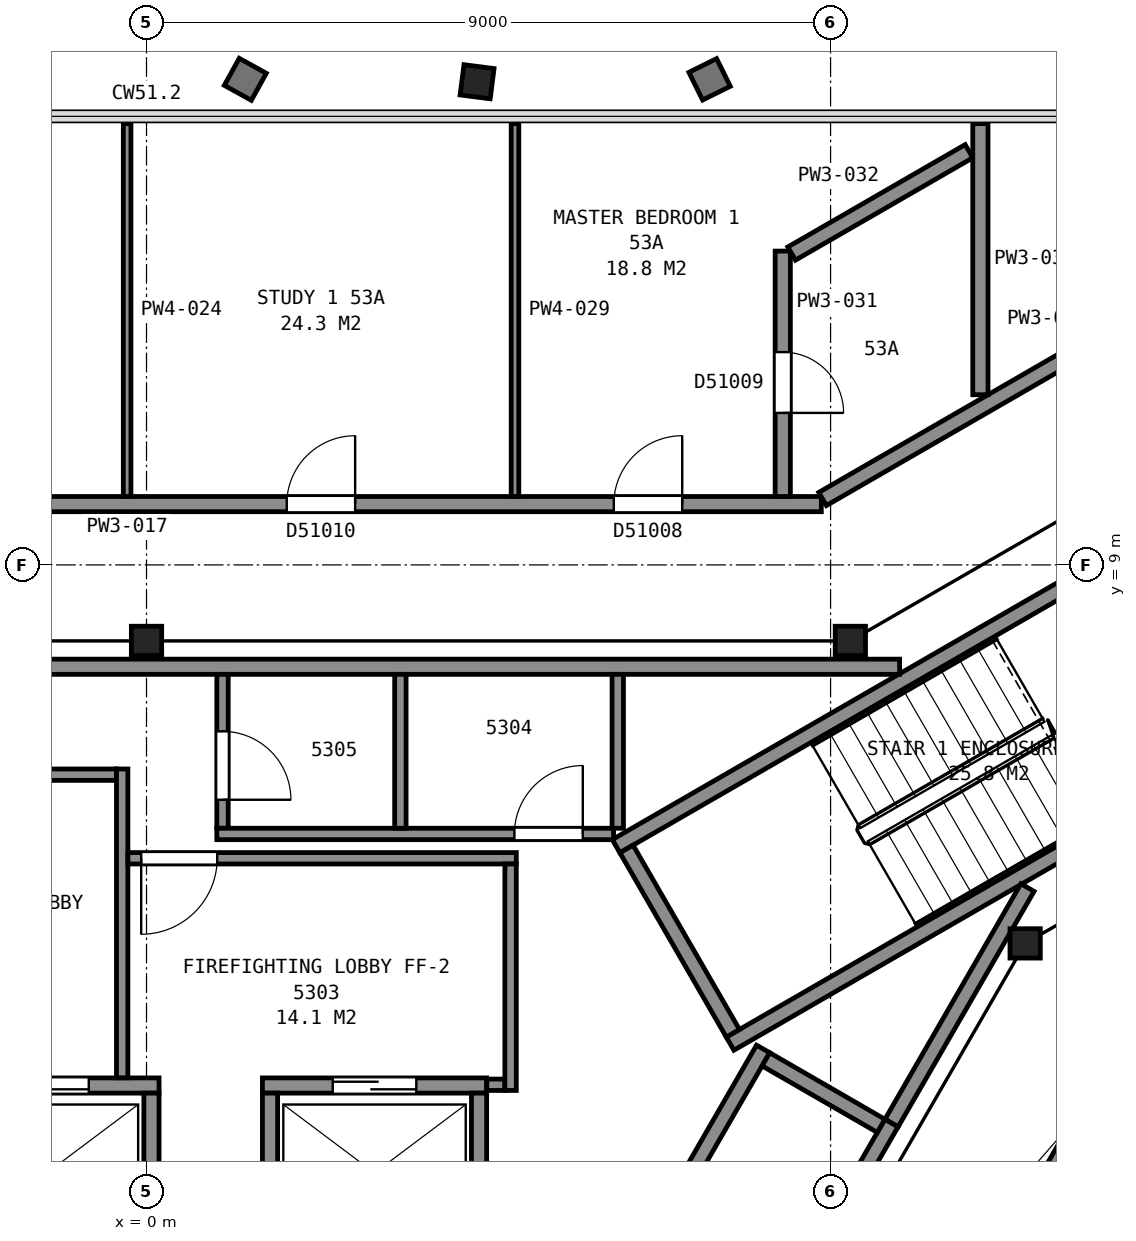
"""IFC4 building model, lengths in metres.
Left out: names, types, materials, properties, quantities, classifications, styles, units other than length and angle.
Written with IfcOpenShell. Run it as: python <this file> out.ifc"""

import sys

from ifc_helpers import new_model, si_unit, direction, frame, frame_2d, origin, origin_2d, place, context, subcontext, project, spatial, rectangle, i_section, extrude, element, fill, save


model = new_model("IFC4")
c1 = context("Model", 3, precision=1e-05, world=origin(), true_north=direction((0.0, 1.0)))
c2 = subcontext(c1, "Body", "Model", "MODEL_VIEW")
j1 = project(units=[si_unit("LENGTHUNIT", "METRE"), si_unit("PLANEANGLEUNIT", "RADIAN")], contexts=[c1])
p1 = place(None, origin())
s1 = spatial("IfcSite", under=j1, at=p1, CompositionType="ELEMENT")
p2 = place(p1, origin())
s2 = spatial("IfcBuilding", under=s1, at=p2, CompositionType="ELEMENT")
p3 = place(p2, frame((0.0, 0.0, 213.8)))
s3 = spatial("IfcBuildingStorey", under=s2, at=p3, CompositionType="ELEMENT", Elevation=213.8)
p4 = place(p3, frame((4.321, 15.137, 0.035), z_axis=(0.023914784976, 0.185835055632, 0.982289883465), x_axis=(0.999704292693, -0.000115278447, -0.024316946377)))
e1 = element("IfcColumn", 1, at=p4, inside=s3, PredefinedType="COLUMN", context=c2, shape_type="SweptSolid", body=[
    extrude(i_section(OverallWidth=0.401, OverallDepth=0.399, WebThickness=0.025, FlangeThickness=0.04, FilletRadius=0.015, at=origin_2d()), origin(), (0.0, 0.0, 1.0), 3.696),
])
for number, where, z_axis, x_axis in (
    (2, (11.56, 4.02, 0.0), (0.0, 0.0, 1.0), (1.0, 0.0, 0.0)),
    (3, (9.26, 8.0, 0.0), (0.0, 0.0, 1.0), (1.0, 0.0, 0.0)),
    (4, (0.0, 8.0, 0.0), (0.0, 0.0, 1.0), (1.0, 0.0, 0.0)),
):
    element("IfcColumn", number, at=place(p3, frame(where, z_axis=z_axis, x_axis=x_axis)), inside=s3, PredefinedType="COLUMN", context=c2, shape_type="SweptSolid", body=[
        extrude(i_section(OverallWidth=0.399, OverallDepth=0.386, WebThickness=0.021, FlangeThickness=0.033, FilletRadius=0.015, at=origin_2d()), origin(), (0.0, 0.0, 1.0), 3.7),
    ])
for number, where, z_axis, x_axis in (
    (5, (6.178, 5.299, 0.0), (0.0, 0.0, 1.0), (0.866, 0.5, 0.0)),
    (6, (7.678, 2.701, 0.0), (0.0, 0.0, 1.0), (0.866, 0.5, 0.0)),
):
    element("IfcWall", number, at=place(p3, frame(where, z_axis=z_axis, x_axis=x_axis)), inside=s3, PredefinedType="PARTITIONING", context=c2, shape_type="SweptSolid", body=[
        extrude(rectangle(XDim=9.6, YDim=0.2, at=frame_2d((4.8, 0.0))), origin(), (0.0, 0.0, 1.0), 3.45),
    ])
p5 = place(p3, frame((7.715, 2.838, 0.0), z_axis=(0.0, 0.0, 1.0), x_axis=(-0.500049511043, 0.865996816683, 0.0)))
e7 = element("IfcWall", 7, at=p5, inside=s3, PredefinedType="PARTITIONING", context=c2, shape_type="SweptSolid", body=[
    extrude(rectangle(XDim=2.8, YDim=0.2, at=frame_2d((1.4, 0.0))), origin(), (0.0, 0.0, 1.0), 3.45),
])
p6 = place(p3, frame((-2.785, 2.15, 0.0), z_axis=(0.0, 0.0, 1.0), x_axis=(1.0, 0.0, 0.0)))
e8 = element("IfcWall", 8, at=p6, inside=s3, PredefinedType="PARTITIONING", context=c2, shape_type="SweptSolid", body=[
    extrude(rectangle(XDim=2.95, YDim=0.2, at=frame_2d((1.475, 0.0))), origin(), (0.0, 0.0, 1.0), 3.7),
])
p7 = place(p6, frame((0.925, 0.0, 0.0)))
e9 = element("IfcOpeningElement", 9, at=p7, cuts=e8, PredefinedType="OPENING", context=c2, shape_type="SweptSolid", body=[
    extrude(rectangle(XDim=1.1, YDim=2.1, at=frame_2d((0.55, 1.05))), frame((0.0, 0.11, 0.0), z_axis=(0.0, -1.0, 0.0), x_axis=(1.0, 0.0, 0.0)), (0.0, 0.0, 1.0), 0.22),
])
p8 = place(p3, frame((1.525, 2.15, 0.0), z_axis=(0.0, 0.0, 1.0), x_axis=(1.0, 0.0, 0.0)))
e10 = element("IfcWall", 10, at=p8, inside=s3, PredefinedType="PARTITIONING", context=c2, shape_type="SweptSolid", body=[
    extrude(rectangle(XDim=2.95, YDim=0.2, at=frame_2d((1.475, 0.0))), origin(), (0.0, 0.0, 1.0), 3.7),
])
p9 = place(p8, frame((0.925, 0.0, 0.0)))
e11 = element("IfcOpeningElement", 11, at=p9, cuts=e10, PredefinedType="OPENING", context=c2, shape_type="SweptSolid", body=[
    extrude(rectangle(XDim=1.1, YDim=2.1, at=frame_2d((0.55, 1.05))), frame((0.0, 0.11, 0.0), z_axis=(0.0, -1.0, 0.0), x_axis=(1.0, 0.0, 0.0)), (0.0, 0.0, 1.0), 0.22),
])
p10 = place(p3, frame((7.351, -2.587, 0.0), z_axis=(0.0, 0.0, 1.0), x_axis=(0.500002801628, 0.866023786258, 0.0)))
e12 = element("IfcWall", 12, at=p10, inside=s3, PredefinedType="PARTITIONING", context=c2, shape_type="SweptSolid", body=[
    extrude(rectangle(XDim=4.9, YDim=0.2, at=frame_2d((2.45, 0.0))), origin(), (0.0, 0.0, 1.0), 3.7),
])
p11 = place(p3, frame((5.663, -1.612, 0.0), z_axis=(0.0, 0.0, 1.0), x_axis=(0.49998122708, 0.866036242063, 0.0)))
e13 = element("IfcWall", 13, at=p11, inside=s3, PredefinedType="PARTITIONING", context=c2, shape_type="SweptSolid", body=[
    extrude(rectangle(XDim=4.9, YDim=0.2, at=frame_2d((2.45, 0.0))), origin(), (0.0, 0.0, 1.0), 3.7),
])
for number, where, z_axis, x_axis in (
    (14, (4.375, 0.1, 0.0), (0.0, 0.0, 1.0), (0.0, 1.0, 0.0)),
    (15, (1.625, 0.1, 0.0), (0.0, 0.0, 1.0), (0.0, 1.0, 0.0)),
    (16, (0.065, 0.1, 0.0), (0.0, 0.0, 1.0), (0.0, 1.0, 0.0)),
):
    element("IfcWall", number, at=place(p3, frame(where, z_axis=z_axis, x_axis=x_axis)), inside=s3, PredefinedType="PARTITIONING", context=c2, shape_type="SweptSolid", body=[
        extrude(rectangle(XDim=1.95, YDim=0.2, at=frame_2d((0.975, 0.0))), origin(), (0.0, 0.0, 1.0), 3.7),
    ])
p12 = place(p3, frame((9.665, 1.62, 0.0), z_axis=(0.0, 0.0, 1.0), x_axis=(-0.866002029911, 0.500040482552, 0.0)))
e17 = element("IfcWall", 17, at=p12, inside=s3, PredefinedType="PARTITIONING", context=c2, shape_type="SweptSolid", body=[
    extrude(rectangle(XDim=1.75, YDim=0.2, at=frame_2d((0.875, 0.0))), origin(), (0.0, 0.0, 1.0), 3.7),
])
p13 = place(p3, frame((-3.933, 6.24, 0.0), z_axis=(0.0, 0.0, 1.0), x_axis=(1.0, 0.0, 0.0)))
e18 = element("IfcWall", 18, at=p13, inside=s3, PredefinedType="PARTITIONING", context=c2, shape_type="SweptSolid", body=[
    extrude(rectangle(XDim=3.538, YDim=0.15, at=frame_2d((1.769, 0.0))), origin(), (0.0, 0.0, 1.0), 3.45),
])
p14 = place(p13, frame((1.3, 0.0, 0.0)))
e19 = element("IfcOpeningElement", 19, at=p14, cuts=e18, PredefinedType="OPENING", context=c2, shape_type="SweptSolid", body=[
    extrude(rectangle(XDim=1.0, YDim=2.1, at=frame_2d((0.5, 1.05))), frame((0.0, 0.085, 0.0), z_axis=(0.0, -1.0, 0.0), x_axis=(1.0, 0.0, 0.0)), (0.0, 0.0, 1.0), 0.17),
])
p15 = place(p3, frame((-3.933, 7.66, 0.0), z_axis=(0.0, 0.0, 1.0), x_axis=(1.0, 0.0, 0.0)))
e20 = element("IfcWall", 20, at=p15, inside=s3, PredefinedType="PARTITIONING", context=c2, shape_type="SweptSolid", body=[
    extrude(rectangle(XDim=13.841, YDim=0.2, at=frame_2d((6.92, 0.0))), origin(), (0.0, 0.0, 1.0), 3.45),
])
p16 = place(p3, frame((-0.32, 2.252, 0.0), z_axis=(0.0, 0.0, 1.0), x_axis=(0.0, 1.0, 0.0)))
e21 = element("IfcWall", 21, at=p16, inside=s3, PredefinedType="PARTITIONING", context=c2, shape_type="SweptSolid", body=[
    extrude(rectangle(XDim=4.063, YDim=0.15, at=frame_2d((2.031, 0.0))), origin(), (0.0, 0.0, 1.0), 3.45),
])
p17 = place(p3, frame((-0.245, 5.14, 0.0), z_axis=(0.0, 0.0, 1.0), x_axis=(1.0, 0.0, 0.0)))
e22 = element("IfcWall", 22, at=p17, inside=s3, PredefinedType="PARTITIONING", context=c2, shape_type="SweptSolid", body=[
    extrude(rectangle(XDim=5.11, YDim=0.15, at=frame_2d((2.555, 0.0))), origin(), (0.0, 0.0, 1.0), 3.45),
])
p18 = place(p17, frame((0.175, 0.0, 0.0)))
e23 = element("IfcOpeningElement", 23, at=p18, cuts=e22, PredefinedType="OPENING", context=c2, shape_type="SweptSolid", body=[
    extrude(rectangle(XDim=1.0, YDim=2.1, at=frame_2d((0.5, 1.05))), frame((0.0, 0.085, 0.0), z_axis=(0.0, -1.0, 0.0), x_axis=(1.0, 0.0, 0.0)), (0.0, 0.0, 1.0), 0.17),
])
p19 = place(p3, frame((1.0, 7.56, 0.0), z_axis=(0.0, 0.0, 1.0), x_axis=(0.0, -1.0, 0.0)))
e24 = element("IfcWall", 24, at=p19, inside=s3, PredefinedType="PARTITIONING", context=c2, shape_type="SweptSolid", body=[
    extrude(rectangle(XDim=2.025, YDim=0.15, at=frame_2d((1.013, 0.0))), origin(), (0.0, 0.0, 1.0), 3.45),
])
p20 = place(p19, frame((0.75, 0.0, 0.0)))
e25 = element("IfcOpeningElement", 25, at=p20, cuts=e24, PredefinedType="OPENING", context=c2, shape_type="SweptSolid", body=[
    extrude(rectangle(XDim=0.9, YDim=2.1, at=frame_2d((0.45, 1.05))), frame((0.0, 0.085, 0.0), z_axis=(0.0, -1.0, 0.0), x_axis=(1.0, 0.0, 0.0)), (0.0, 0.0, 1.0), 0.17),
])
p21 = place(p3, frame((0.925, 5.46, 0.0), z_axis=(0.0, 0.0, 1.0), x_axis=(1.0, 0.0, 0.0)))
e26 = element("IfcWall", 26, at=p21, inside=s3, PredefinedType="PARTITIONING", context=c2, shape_type="SweptSolid", body=[
    extrude(rectangle(XDim=5.22, YDim=0.15, at=frame_2d((2.61, 0.0))), origin(), (0.0, 0.0, 1.0), 3.45),
])
p22 = place(p21, frame((3.915, 0.0, 0.0)))
e27 = element("IfcOpeningElement", 27, at=p22, cuts=e26, PredefinedType="OPENING", context=c2, shape_type="SweptSolid", body=[
    extrude(rectangle(XDim=0.9, YDim=2.1, at=frame_2d((0.45, 1.05))), frame((0.0, 0.085, 0.0), z_axis=(0.0, -1.0, 0.0), x_axis=(1.0, 0.0, 0.0)), (0.0, 0.0, 1.0), 0.17),
])
p23 = place(p3, frame((3.34, 5.535, 0.0), z_axis=(0.0, 0.0, 1.0), x_axis=(0.0, 1.0, 0.0)))
e28 = element("IfcWall", 28, at=p23, inside=s3, PredefinedType="PARTITIONING", context=c2, shape_type="SweptSolid", body=[
    extrude(rectangle(XDim=2.025, YDim=0.15, at=frame_2d((1.013, 0.0))), origin(), (0.0, 0.0, 1.0), 3.45),
])
p24 = place(p3, frame((4.477, 2.16, 0.0), z_axis=(0.0, 0.0, 1.0), x_axis=(1.0, 0.0, 0.0)))
e29 = element("IfcWall", 29, at=p24, inside=s3, PredefinedType="PARTITIONING", context=c2, shape_type="SweptSolid", body=[
    extrude(rectangle(XDim=0.238, YDim=0.15, at=frame_2d((0.119, 0.0))), origin(), (0.0, 0.0, 1.0), 3.45),
])
p25 = place(p3, frame((4.79, 2.085, 0.0), z_axis=(0.0, 0.0, 1.0), x_axis=(0.0, 1.0, 0.0)))
e30 = element("IfcWall", 30, at=p25, inside=s3, PredefinedType="PARTITIONING", context=c2, shape_type="SweptSolid", body=[
    extrude(rectangle(XDim=2.98, YDim=0.15, at=frame_2d((1.49, 0.0))), origin(), (0.0, 0.0, 1.0), 3.45),
])
p26 = place(p3, frame((6.2, 5.535, 0.0), z_axis=(0.0, 0.0, 1.0), x_axis=(0.0, 1.0, 0.0)))
e31 = element("IfcWall", 31, at=p26, inside=s3, PredefinedType="PARTITIONING", context=c2, shape_type="SweptSolid", body=[
    extrude(rectangle(XDim=2.025, YDim=0.15, at=frame_2d((1.013, 0.0))), origin(), (0.0, 0.0, 1.0), 3.45),
])
p27 = place(p3, frame((9.803, 1.658, 0.0), z_axis=(0.0, 0.0, 1.0), x_axis=(0.499943114462, 0.866058244174, 0.0)))
e32 = element("IfcWall", 32, at=p27, inside=s3, PredefinedType="PARTITIONING", context=c2, shape_type="SweptSolid", body=[
    extrude(rectangle(XDim=3.576, YDim=0.2, at=frame_2d((1.788, 0.0))), origin(), (0.0, 0.0, 1.0), 3.45),
])
p28 = place(p3, frame((-8.828, 9.8, 0.0), z_axis=(0.0, 0.0, 1.0), x_axis=(1.0, 0.0, 0.0)))
e33 = element("IfcWall", 33, at=p28, inside=s3, PredefinedType="PARTITIONING", context=c2, shape_type="SweptSolid", body=[
    extrude(rectangle(XDim=17.706, YDim=0.2, at=frame_2d((8.853, 0.0))), origin(), (0.0, 0.0, 1.0), 2.713),
])
p29 = place(p28, frame((14.976, 0.0, 0.0)))
e34 = element("IfcOpeningElement", 34, at=p29, cuts=e33, PredefinedType="OPENING", context=c2, shape_type="SweptSolid", body=[
    extrude(rectangle(XDim=0.9, YDim=2.1, at=frame_2d((0.45, 1.05))), frame((0.0, 0.11, 0.0), z_axis=(0.0, -1.0, 0.0), x_axis=(1.0, 0.0, 0.0)), (0.0, 0.0, 1.0), 0.22),
])
p30 = place(p28, frame((10.673, 0.0, 0.0)))
e35 = element("IfcOpeningElement", 35, at=p30, cuts=e33, PredefinedType="OPENING", context=c2, shape_type="SweptSolid", body=[
    extrude(rectangle(XDim=0.9, YDim=2.1, at=frame_2d((0.45, 1.05))), frame((0.0, 0.11, 0.0), z_axis=(0.0, -1.0, 0.0), x_axis=(1.0, 0.0, 0.0)), (0.0, 0.0, 1.0), 0.22),
])
p31 = place(p28, frame((5.57, 0.0, 0.0)))
e36 = element("IfcOpeningElement", 36, at=p31, cuts=e33, PredefinedType="OPENING", context=c2, shape_type="SweptSolid", body=[
    extrude(rectangle(XDim=0.9, YDim=2.1, at=frame_2d((0.45, 1.05))), frame((0.0, 0.11, 0.0), z_axis=(0.0, -1.0, 0.0), x_axis=(1.0, 0.0, 0.0)), (0.0, 0.0, 1.0), 0.22),
])
p32 = place(p28, frame((1.3, 0.0, 0.0)))
e37 = element("IfcOpeningElement", 37, at=p32, cuts=e33, PredefinedType="OPENING", context=c2, shape_type="SweptSolid", body=[
    extrude(rectangle(XDim=0.9, YDim=2.1, at=frame_2d((0.45, 1.05))), frame((0.0, 0.11, 0.0), z_axis=(0.0, -1.0, 0.0), x_axis=(1.0, 0.0, 0.0)), (0.0, 0.0, 1.0), 0.22),
])
p33 = place(p3, frame((-0.255, 9.9, 0.0), z_axis=(0.0, 0.0, 1.0), x_axis=(0.0, 1.0, 0.0)))
e38 = element("IfcWall", 38, at=p33, inside=s3, PredefinedType="PARTITIONING", context=c2, shape_type="SweptSolid", body=[
    extrude(rectangle(XDim=4.906, YDim=0.1, at=frame_2d((2.453, 0.0))), origin(), (0.0, 0.0, 1.0), 2.713),
])
p34 = place(p3, frame((12.903, 2.745, 0.0), z_axis=(0.0, 0.0, 1.0), x_axis=(-0.499999743747, -0.866025551732, 0.0)))
e39 = element("IfcWall", 39, at=p34, inside=s3, PredefinedType="PARTITIONING", context=c2, shape_type="SweptSolid", body=[
    extrude(rectangle(XDim=17.656, YDim=0.2, at=frame_2d((8.828, 0.0))), origin(), (0.0, 0.0, 1.0), 2.713),
])
p35 = place(p34, frame((12.756, 0.0, 0.0)))
e40 = element("IfcOpeningElement", 40, at=p35, cuts=e39, PredefinedType="OPENING", context=c2, shape_type="SweptSolid", body=[
    extrude(rectangle(XDim=1.2, YDim=2.1, at=frame_2d((0.6, 1.05))), frame((0.0, 0.11, 0.0), z_axis=(0.0, -1.0, 0.0), x_axis=(1.0, 0.0, 0.0)), (0.0, 0.0, 1.0), 0.22),
])
p36 = place(p34, frame((7.044, 0.0, 0.0)))
e41 = element("IfcOpeningElement", 41, at=p36, cuts=e39, PredefinedType="OPENING", context=c2, shape_type="SweptSolid", body=[
    extrude(rectangle(XDim=0.9, YDim=2.1, at=frame_2d((0.45, 1.05))), frame((0.0, 0.11, 0.0), z_axis=(0.0, -1.0, 0.0), x_axis=(1.0, 0.0, 0.0)), (0.0, 0.0, 1.0), 0.22),
])
p37 = place(p34, frame((0.417, 0.0, 0.0)))
e42 = element("IfcOpeningElement", 42, at=p37, cuts=e39, PredefinedType="OPENING", context=c2, shape_type="SweptSolid", body=[
    extrude(rectangle(XDim=0.9, YDim=2.1, at=frame_2d((0.45, 1.05))), frame((0.0, 0.11, 0.0), z_axis=(0.0, -1.0, 0.0), x_axis=(1.0, 0.0, 0.0)), (0.0, 0.0, 1.0), 0.22),
])
p38 = place(p3, frame((4.848, 9.9, 0.0), z_axis=(0.0, 0.0, 1.0), x_axis=(0.0, 1.0, 0.0)))
e43 = element("IfcWall", 43, at=p38, inside=s3, PredefinedType="PARTITIONING", context=c2, shape_type="SweptSolid", body=[
    extrude(rectangle(XDim=4.906, YDim=0.1, at=frame_2d((2.453, 0.0))), origin(), (0.0, 0.0, 1.0), 2.713),
])
p39 = place(p3, frame((8.371, 13.129, 0.0), z_axis=(0.0, 0.0, 1.0), x_axis=(0.0, -1.0, 0.0)))
e44 = element("IfcWall", 44, at=p39, inside=s3, PredefinedType="PARTITIONING", context=c2, shape_type="SweptSolid", body=[
    extrude(rectangle(XDim=3.229, YDim=0.2, at=frame_2d((1.615, 0.0))), origin(), (0.0, 0.0, 1.0), 2.713),
])
p40 = place(p39, frame((1.329, 0.0, 0.0)))
e45 = element("IfcOpeningElement", 45, at=p40, cuts=e44, PredefinedType="OPENING", context=c2, shape_type="SweptSolid", body=[
    extrude(rectangle(XDim=0.8, YDim=2.1, at=frame_2d((0.4, 1.05))), frame((0.0, 0.11, 0.0), z_axis=(0.0, -1.0, 0.0), x_axis=(1.0, 0.0, 0.0)), (0.0, 0.0, 1.0), 0.22),
])
p41 = place(p3, frame((8.488, 13.096, 0.0), z_axis=(0.0, 0.0, 1.0), x_axis=(0.866031650062, 0.499989180974, 0.0)))
e46 = element("IfcWall", 46, at=p41, inside=s3, PredefinedType="PARTITIONING", context=c2, shape_type="SweptSolid", body=[
    extrude(rectangle(XDim=2.694, YDim=0.2, at=frame_2d((1.347, 0.0))), origin(), (0.0, 0.0, 1.0), 2.713),
])
p42 = place(p3, frame((8.895, 9.867, 0.0), z_axis=(0.0, 0.0, 1.0), x_axis=(0.866079355551, 0.499906541154, 0.0)))
e47 = element("IfcWall", 47, at=p42, inside=s3, PredefinedType="PARTITIONING", context=c2, shape_type="SweptSolid", body=[
    extrude(rectangle(XDim=8.113, YDim=0.2, at=frame_2d((4.056, 0.0))), origin(), (0.0, 0.0, 1.0), 2.713),
])
p43 = place(p3, frame((10.971, 11.239, 0.0), z_axis=(0.0, 0.0, 1.0), x_axis=(0.0, 1.0, 0.0)))
e48 = element("IfcWall", 48, at=p43, inside=s3, PredefinedType="PARTITIONING", context=c2, shape_type="SweptSolid", body=[
    extrude(rectangle(XDim=3.567, YDim=0.2, at=frame_2d((1.783, 0.0))), origin(), (0.0, 0.0, 1.0), 2.713),
])
p44 = place(p7, origin())
e49 = element("IfcDoor", 49, at=p44, inside=s3, OperationType="SLIDING_TO_LEFT", PredefinedType="DOOR", context=c2, shape_type="SweptSolid", body=[
    extrude(rectangle(XDim=1.1, YDim=2.1, at=frame_2d((0.55, 1.05))), frame((0.0, 0.025, 0.0), z_axis=(0.0, -1.0, 0.0), x_axis=(1.0, 0.0, 0.0)), (0.0, 0.0, 1.0), 0.05),
])
fill(e9, e49)
p45 = place(p9, origin())
e50 = element("IfcDoor", 50, at=p45, inside=s3, OperationType="SLIDING_TO_RIGHT", PredefinedType="DOOR", context=c2, shape_type="SweptSolid", body=[
    extrude(rectangle(XDim=1.1, YDim=2.1, at=frame_2d((0.55, 1.05))), frame((0.0, 0.025, 0.0), z_axis=(0.0, -1.0, 0.0), x_axis=(1.0, 0.0, 0.0)), (0.0, 0.0, 1.0), 0.05),
])
fill(e11, e50)
p46 = place(p18, origin())
e51 = element("IfcDoor", 51, at=p46, inside=s3, OperationType="SINGLE_SWING_LEFT", PredefinedType="DOOR", context=c2, shape_type="SweptSolid", body=[
    extrude(rectangle(XDim=1.0, YDim=2.1, at=frame_2d((0.5, 1.05))), frame((0.0, 0.025, 0.0), z_axis=(0.0, -1.0, 0.0), x_axis=(1.0, 0.0, 0.0)), (0.0, 0.0, 1.0), 0.05),
])
fill(e23, e51)
p47 = place(p20, origin())
e52 = element("IfcDoor", 52, at=p47, inside=s3, OperationType="SINGLE_SWING_RIGHT", PredefinedType="DOOR", context=c2, shape_type="SweptSolid", body=[
    extrude(rectangle(XDim=0.9, YDim=2.1, at=frame_2d((0.45, 1.05))), frame((0.0, 0.025, 0.0), z_axis=(0.0, -1.0, 0.0), x_axis=(1.0, 0.0, 0.0)), (0.0, 0.0, 1.0), 0.05),
])
fill(e25, e52)
p48 = place(p22, origin())
e53 = element("IfcDoor", 53, at=p48, inside=s3, OperationType="SINGLE_SWING_RIGHT", PredefinedType="DOOR", context=c2, shape_type="SweptSolid", body=[
    extrude(rectangle(XDim=0.9, YDim=2.1, at=frame_2d((0.45, 1.05))), frame((0.0, 0.025, 0.0), z_axis=(0.0, -1.0, 0.0), x_axis=(1.0, 0.0, 0.0)), (0.0, 0.0, 1.0), 0.05),
])
fill(e27, e53)
p49 = place(p29, origin())
e54 = element("IfcDoor", 54, at=p49, inside=s3, OperationType="SINGLE_SWING_RIGHT", PredefinedType="DOOR", context=c2, shape_type="SweptSolid", body=[
    extrude(rectangle(XDim=0.9, YDim=2.1, at=frame_2d((0.45, 1.05))), frame((0.0, 0.025, 0.0), z_axis=(0.0, -1.0, 0.0), x_axis=(1.0, 0.0, 0.0)), (0.0, 0.0, 1.0), 0.05),
])
fill(e34, e54)
p50 = place(p30, origin())
e55 = element("IfcDoor", 55, at=p50, inside=s3, OperationType="SINGLE_SWING_RIGHT", PredefinedType="DOOR", context=c2, shape_type="SweptSolid", body=[
    extrude(rectangle(XDim=0.9, YDim=2.1, at=frame_2d((0.45, 1.05))), frame((0.0, 0.025, 0.0), z_axis=(0.0, -1.0, 0.0), x_axis=(1.0, 0.0, 0.0)), (0.0, 0.0, 1.0), 0.05),
])
fill(e35, e55)
p51 = place(p40, origin())
e56 = element("IfcDoor", 56, at=p51, inside=s3, OperationType="SINGLE_SWING_RIGHT", PredefinedType="DOOR", context=c2, shape_type="SweptSolid", body=[
    extrude(rectangle(XDim=0.8, YDim=2.1, at=frame_2d((0.4, 1.05))), frame((0.0, 0.025, 0.0), z_axis=(0.0, -1.0, 0.0), x_axis=(1.0, 0.0, 0.0)), (0.0, 0.0, 1.0), 0.05),
])
fill(e45, e56)
save(model, sys.argv[1])
